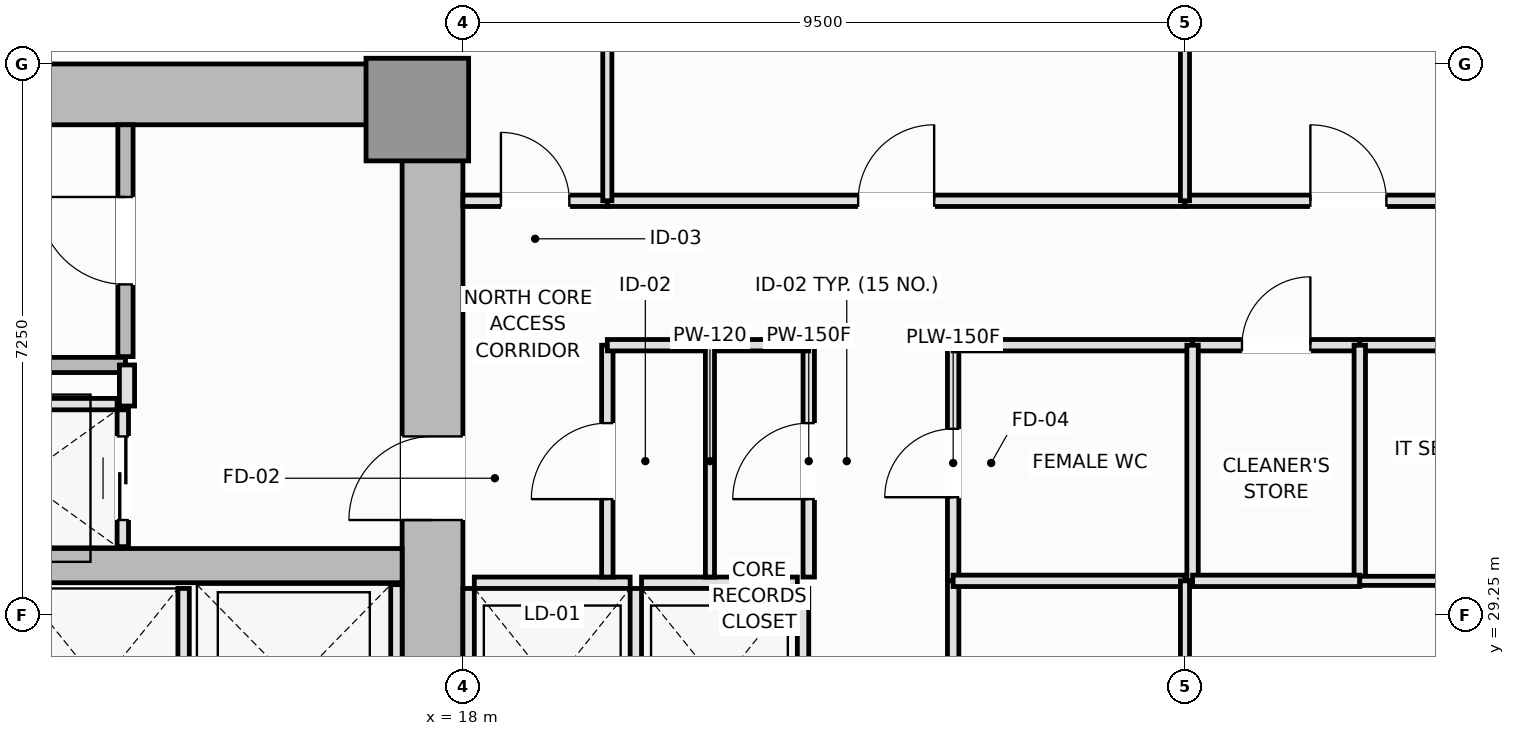
"""IFC4 building model, lengths in metres.
Left out: names, types, materials, properties, quantities, classifications, styles, units other than length and angle.
Written with IfcOpenShell. Run it as: python <this file> out.ifc"""

import sys

from ifc_helpers import new_model, si_unit, direction, frame, frame_2d, origin, origin_2d, place, context, subcontext, project, spatial, rectangle, extrude, element, fill, save


model = new_model("IFC4")
c1 = context("Model", 3, precision=1e-05, world=origin(), true_north=direction((0.0, 1.0)))
c2 = subcontext(c1, "Body", "Model", "MODEL_VIEW")
j1 = project(units=[si_unit("LENGTHUNIT", "METRE"), si_unit("PLANEANGLEUNIT", "RADIAN")], contexts=[c1])
p1 = place(None, origin())
s1 = spatial("IfcSite", under=j1, at=p1, CompositionType="ELEMENT")
p2 = place(p1, origin())
s2 = spatial("IfcBuilding", under=s1, at=p2, CompositionType="ELEMENT")
p3 = place(p2, frame((0.0, 0.0, 75.3)))
s3 = spatial("IfcBuildingStorey", under=s2, at=p3, CompositionType="ELEMENT", Elevation=75.3)
p4 = place(p3, frame((4.5, 36.1, 0.0), z_axis=(0.0, 0.0, 1.0), x_axis=(1.0, 0.0, 0.0)))
e1 = element("IfcWall", 1, at=p4, inside=s3, PredefinedType="SHEAR", context=c2, shape_type="SweptSolid", body=[
    extrude(rectangle(XDim=13.5, YDim=0.8, at=frame_2d((6.75, 0.0))), origin(), (0.0, 0.0, 1.0), 3.55),
])
p5 = place(p3, frame((17.6, 27.05, 0.0), z_axis=(0.0, 0.0, 1.0), x_axis=(0.0, 1.0, 0.0)))
e2 = element("IfcWall", 2, at=p5, inside=s3, PredefinedType="SHEAR", context=c2, shape_type="SweptSolid", body=[
    extrude(rectangle(XDim=8.65, YDim=0.8, at=frame_2d((4.325, 0.0))), origin(), (0.0, 0.0, 1.0), 3.55),
])
p6 = place(p5, frame((3.45, 0.0, 0.0)))
e3 = element("IfcOpeningElement", 3, at=p6, cuts=e2, PredefinedType="OPENING", context=c2, shape_type="SweptSolid", body=[
    extrude(rectangle(XDim=1.1, YDim=2.15, at=frame_2d((0.55, 1.075))), frame((0.0, 0.41, 0.0), z_axis=(0.0, -1.0, 0.0), x_axis=(1.0, 0.0, 0.0)), (0.0, 0.0, 1.0), 0.82),
])
p7 = place(p3, frame((5.3, 29.9, 0.0), z_axis=(0.0, 0.0, 1.0), x_axis=(1.0, 0.0, 0.0)))
e4 = element("IfcWall", 4, at=p7, inside=s3, PredefinedType="SHEAR", context=c2, shape_type="SweptSolid", body=[
    extrude(rectangle(XDim=11.9, YDim=0.45, at=frame_2d((5.95, 0.0))), origin(), (0.0, 0.0, 1.0), 3.55),
])
p8 = place(p3, frame((17.4, 35.9, 0.0), z_axis=(0.0, 0.0, 1.0), x_axis=(1.0, 0.0, 0.0)))
e5 = element("IfcColumn", 5, at=p8, inside=s3, PredefinedType="PILASTER", context=c2, shape_type="SweptSolid", body=[
    extrude(rectangle(XDim=1.35, YDim=1.35, at=origin_2d()), origin(), (0.0, 0.0, 1.0), 3.55),
])
p9 = place(p3, frame((5.9, 32.54, 0.0), z_axis=(0.0, 0.0, 1.0), x_axis=(1.0, 0.0, 0.0)))
e6 = element("IfcWall", 6, at=p9, inside=s3, PredefinedType="SOLIDWALL", context=c2, shape_type="SweptSolid", body=[
    extrude(rectangle(XDim=7.66, YDim=0.2, at=frame_2d((3.83, 0.0))), origin(), (0.0, 0.0, 1.0), 3.55),
])
p10 = place(p3, frame((13.56, 32.65, 0.0), z_axis=(0.0, 0.0, 1.0), x_axis=(0.0, 1.0, 0.0)))
e7 = element("IfcWall", 7, at=p10, inside=s3, PredefinedType="SOLIDWALL", context=c2, shape_type="SweptSolid", body=[
    extrude(rectangle(XDim=3.05, YDim=0.2, at=frame_2d((1.525, 0.0))), origin(), (0.0, 0.0, 1.0), 3.55),
])
p11 = place(p10, frame((0.95, 0.0, 0.0)))
e8 = element("IfcOpeningElement", 8, at=p11, cuts=e7, PredefinedType="OPENING", context=c2, shape_type="SweptSolid", body=[
    extrude(rectangle(XDim=1.15, YDim=2.15, at=frame_2d((0.575, 1.075))), frame((0.0, 0.11, 0.0), z_axis=(0.0, -1.0, 0.0), x_axis=(1.0, 0.0, 0.0)), (0.0, 0.0, 1.0), 0.22),
])
p12 = place(p3, frame((18.15, 29.675, 0.0), z_axis=(0.0, 0.0, 1.0), x_axis=(1.0, 0.0, 0.0)))
e9 = element("IfcWall", 9, at=p12, inside=s3, PredefinedType="PARTITIONING", context=c2, shape_type="SweptSolid", body=[
    extrude(rectangle(XDim=2.05, YDim=0.15, at=frame_2d((1.025, 0.0))), origin(), (0.0, 0.0, 1.0), 3.37),
])
for number, where, z_axis, x_axis in (
    (10, (18.075, 27.05, 0.0), (0.0, 0.0, 1.0), (0.0, 1.0, 0.0)),
    (11, (20.275, 27.05, 0.0), (0.0, 0.0, 1.0), (0.0, 1.0, 0.0)),
):
    element("IfcWall", number, at=place(p3, frame(where, z_axis=z_axis, x_axis=x_axis)), inside=s3, PredefinedType="PARTITIONING", context=c2, shape_type="SweptSolid", body=[
        extrude(rectangle(XDim=2.55, YDim=0.15, at=frame_2d((1.275, 0.0))), origin(), (0.0, 0.0, 1.0), 3.37),
    ])
p13 = place(p3, frame((20.35, 29.675, 0.0), z_axis=(0.0, 0.0, 1.0), x_axis=(1.0, 0.0, 0.0)))
e12 = element("IfcWall", 12, at=p13, inside=s3, PredefinedType="PARTITIONING", context=c2, shape_type="SweptSolid", body=[
    extrude(rectangle(XDim=2.05, YDim=0.15, at=frame_2d((1.025, 0.0))), origin(), (0.0, 0.0, 1.0), 3.37),
])
for number, where, z_axis, x_axis in (
    (13, (22.475, 27.05, 0.0), (0.0, 0.0, 1.0), (0.0, 1.0, 0.0)),
    (14, (14.325, 27.05, 0.0), (0.0, 0.0, 1.0), (0.0, 1.0, 0.0)),
):
    element("IfcWall", number, at=place(p3, frame(where, z_axis=z_axis, x_axis=x_axis)), inside=s3, PredefinedType="PARTITIONING", context=c2, shape_type="SweptSolid", body=[
        extrude(rectangle(XDim=2.55, YDim=0.15, at=frame_2d((1.275, 0.0))), origin(), (0.0, 0.0, 1.0), 3.37),
    ])
p14 = place(p3, frame((17.125, 27.05, 0.0), z_axis=(0.0, 0.0, 1.0), x_axis=(0.0, 1.0, 0.0)))
e15 = element("IfcWall", 15, at=p14, inside=s3, PredefinedType="PARTITIONING", context=c2, shape_type="SweptSolid", body=[
    extrude(rectangle(XDim=2.6, YDim=0.15, at=frame_2d((1.3, 0.0))), origin(), (0.0, 0.0, 1.0), 3.37),
])
p15 = place(p3, frame((10.95, 32.025, 0.0), z_axis=(0.0, 0.0, 1.0), x_axis=(1.0, 0.0, 0.0)))
e16 = element("IfcWall", 16, at=p15, inside=s3, PredefinedType="PARTITIONING", context=c2, shape_type="SweptSolid", body=[
    extrude(rectangle(XDim=2.5, YDim=0.15, at=frame_2d((1.25, 0.0))), origin(), (0.0, 0.0, 1.0), 3.37),
])
p16 = place(p3, frame((13.525, 30.15, 0.0), z_axis=(0.0, 0.0, 1.0), x_axis=(0.0, 1.0, 0.0)))
e17 = element("IfcWall", 17, at=p16, inside=s3, PredefinedType="PARTITIONING", context=c2, shape_type="SweptSolid", body=[
    extrude(rectangle(XDim=1.8, YDim=0.15, at=frame_2d((0.9, 0.0))), origin(), (0.0, 0.0, 1.0), 3.37),
])
p17 = place(p16, frame((0.35, 0.0, 0.0)))
e18 = element("IfcOpeningElement", 18, at=p17, cuts=e17, PredefinedType="OPENING", context=c2, shape_type="SweptSolid", body=[
    extrude(rectangle(XDim=1.1, YDim=2.2, at=frame_2d((0.55, 1.1))), frame((0.0, 0.085, 0.0), z_axis=(0.0, -1.0, 0.0), x_axis=(1.0, 0.0, 0.0)), (0.0, 0.0, 1.0), 0.17),
])
p18 = place(p3, frame((13.58, 32.0, 0.0), z_axis=(0.0, 0.0, 1.0), x_axis=(0.0, 1.0, 0.0)))
e19 = element("IfcWall", 19, at=p18, inside=s3, PredefinedType="PARTITIONING", context=c2, shape_type="SweptSolid", body=[
    extrude(rectangle(XDim=0.54, YDim=0.2, at=frame_2d((0.27, 0.0))), origin(), (0.0, 0.0, 1.0), 3.37),
])
p19 = place(p3, frame((22.55, 29.75, 0.0), z_axis=(0.0, 0.0, 1.0), x_axis=(0.0, 1.0, 0.0)))
e20 = element("IfcWall", 20, at=p19, inside=s3, PredefinedType="PARTITIONING", context=c2, shape_type="SweptSolid", body=[
    extrude(rectangle(XDim=3.05, YDim=0.15, at=frame_2d((1.525, 0.0))), origin(), (0.0, 0.0, 1.0), 3.01),
])
p20 = place(p19, frame((1.025, 0.0, 0.0)))
e21 = element("IfcOpeningElement", 21, at=p20, cuts=e20, PredefinedType="OPENING", context=c2, shape_type="SweptSolid", body=[
    extrude(rectangle(XDim=1.0, YDim=2.15, at=frame_2d((0.5, 1.075))), frame((0.0, 0.085, 0.0), z_axis=(0.0, -1.0, 0.0), x_axis=(1.0, 0.0, 0.0)), (0.0, 0.0, 1.0), 0.17),
])
p21 = place(p3, frame((24.45, 29.7, 0.0), z_axis=(0.0, 0.0, 1.0), x_axis=(0.0, 1.0, 0.0)))
e22 = element("IfcWall", 22, at=p21, inside=s3, PredefinedType="PLUMBINGWALL", context=c2, shape_type="SweptSolid", body=[
    extrude(rectangle(XDim=3.1, YDim=0.15, at=frame_2d((1.55, 0.0))), origin(), (0.0, 0.0, 1.0), 3.37),
])
p22 = place(p21, frame((1.1, 0.0, 0.0)))
e23 = element("IfcOpeningElement", 23, at=p22, cuts=e22, PredefinedType="OPENING", context=c2, shape_type="SweptSolid", body=[
    extrude(rectangle(XDim=0.9, YDim=2.1, at=frame_2d((0.45, 1.05))), frame((0.0, 0.085, 0.0), z_axis=(0.0, -1.0, 0.0), x_axis=(1.0, 0.0, 0.0)), (0.0, 0.0, 1.0), 0.17),
])
p23 = place(p3, frame((24.45, 20.8, 0.0), z_axis=(0.0, 0.0, 1.0), x_axis=(0.0, 1.0, 0.0)))
e24 = element("IfcWall", 24, at=p23, inside=s3, PredefinedType="PARTITIONING", context=c2, shape_type="SweptSolid", body=[
    extrude(rectangle(XDim=8.9, YDim=0.15, at=frame_2d((4.45, 0.0))), origin(), (0.0, 0.0, 1.0), 3.37),
])
p24 = place(p23, frame((3.95, 0.0, 0.0)))
e25 = element("IfcOpeningElement", 25, at=p24, cuts=e24, PredefinedType="OPENING", context=c2, shape_type="SweptSolid", body=[
    extrude(rectangle(XDim=1.0, YDim=2.15, at=frame_2d((0.5, 1.075))), frame((0.0, 0.085, 0.0), z_axis=(0.0, -1.0, 0.0), x_axis=(1.0, 0.0, 0.0)), (0.0, 0.0, 1.0), 0.17),
])
p25 = place(p3, frame((19.9, 29.75, 0.0), z_axis=(0.0, 0.0, 1.0), x_axis=(0.0, 1.0, 0.0)))
e26 = element("IfcWall", 26, at=p25, inside=s3, PredefinedType="PARTITIONING", context=c2, shape_type="SweptSolid", body=[
    extrude(rectangle(XDim=3.05, YDim=0.15, at=frame_2d((1.525, 0.0))), origin(), (0.0, 0.0, 1.0), 3.37),
])
p26 = place(p25, frame((1.025, 0.0, 0.0)))
e27 = element("IfcOpeningElement", 27, at=p26, cuts=e26, PredefinedType="OPENING", context=c2, shape_type="SweptSolid", body=[
    extrude(rectangle(XDim=1.0, YDim=2.15, at=frame_2d((0.5, 1.075))), frame((0.0, 0.085, 0.0), z_axis=(0.0, -1.0, 0.0), x_axis=(1.0, 0.0, 0.0)), (0.0, 0.0, 1.0), 0.17),
])
p27 = place(p3, frame((19.9, 32.8, 0.0), z_axis=(0.0, 0.0, 1.0), x_axis=(1.0, 0.0, 0.0)))
e28 = element("IfcWall", 28, at=p27, inside=s3, PredefinedType="PARTITIONING", context=c2, shape_type="SweptSolid", body=[
    extrude(rectangle(XDim=1.35, YDim=0.15, at=frame_2d((0.675, 0.0))), origin(), (0.0, 0.0, 1.0), 3.37),
])
p28 = place(p3, frame((21.25, 32.8, 0.0), z_axis=(0.0, 0.0, 1.0), x_axis=(1.0, 0.0, 0.0)))
e29 = element("IfcWall", 29, at=p28, inside=s3, PredefinedType="PARTITIONING", context=c2, shape_type="SweptSolid", body=[
    extrude(rectangle(XDim=1.3, YDim=0.15, at=frame_2d((0.65, 0.0))), origin(), (0.0, 0.0, 1.0), 3.37),
])
p29 = place(p3, frame((24.45, 32.8, 0.0), z_axis=(0.0, 0.0, 1.0), x_axis=(1.0, 0.0, 0.0)))
e30 = element("IfcWall", 30, at=p29, inside=s3, PredefinedType="PLUMBINGWALL", context=c2, shape_type="SweptSolid", body=[
    extrude(rectangle(XDim=3.15, YDim=0.15, at=frame_2d((1.575, 0.0))), origin(), (0.0, 0.0, 1.0), 3.37),
])
p30 = place(p3, frame((27.6, 32.8, 0.0), z_axis=(0.0, 0.0, 1.0), x_axis=(1.0, 0.0, 0.0)))
e31 = element("IfcWall", 31, at=p30, inside=s3, PredefinedType="PLUMBINGWALL", context=c2, shape_type="SweptSolid", body=[
    extrude(rectangle(XDim=2.2, YDim=0.15, at=frame_2d((1.1, 0.0))), origin(), (0.0, 0.0, 1.0), 3.37),
])
p31 = place(p30, frame((0.65, 0.0, 0.0)))
e32 = element("IfcOpeningElement", 32, at=p31, cuts=e31, PredefinedType="OPENING", context=c2, shape_type="SweptSolid", body=[
    extrude(rectangle(XDim=0.9, YDim=2.1, at=frame_2d((0.45, 1.05))), frame((0.0, 0.085, 0.0), z_axis=(0.0, -1.0, 0.0), x_axis=(1.0, 0.0, 0.0)), (0.0, 0.0, 1.0), 0.17),
])
p32 = place(p3, frame((29.8, 32.8, 0.0), z_axis=(0.0, 0.0, 1.0), x_axis=(1.0, 0.0, 0.0)))
e33 = element("IfcWall", 33, at=p32, inside=s3, PredefinedType="PARTITIONING", context=c2, shape_type="SweptSolid", body=[
    extrude(rectangle(XDim=5.0, YDim=0.15, at=frame_2d((2.5, 0.0))), origin(), (0.0, 0.0, 1.0), 3.37),
])
p33 = place(p3, frame((18.0, 34.7, 0.0), z_axis=(0.0, 0.0, 1.0), x_axis=(1.0, 0.0, 0.0)))
e34 = element("IfcWall", 34, at=p33, inside=s3, PredefinedType="PARTITIONING", context=c2, shape_type="SweptSolid", body=[
    extrude(rectangle(XDim=1.9, YDim=0.15, at=frame_2d((0.95, 0.0))), origin(), (0.0, 0.0, 1.0), 3.37),
])
p34 = place(p33, frame((0.5, 0.0, 0.0)))
e35 = element("IfcOpeningElement", 35, at=p34, cuts=e34, PredefinedType="OPENING", context=c2, shape_type="SweptSolid", body=[
    extrude(rectangle(XDim=0.9, YDim=2.1, at=frame_2d((0.45, 1.05))), frame((0.0, 0.085, 0.0), z_axis=(0.0, -1.0, 0.0), x_axis=(1.0, 0.0, 0.0)), (0.0, 0.0, 1.0), 0.17),
])
p35 = place(p3, frame((19.9, 34.7, 0.0), z_axis=(0.0, 0.0, 1.0), x_axis=(1.0, 0.0, 0.0)))
e36 = element("IfcWall", 36, at=p35, inside=s3, PredefinedType="PARTITIONING", context=c2, shape_type="SweptSolid", body=[
    extrude(rectangle(XDim=7.6, YDim=0.15, at=frame_2d((3.8, 0.0))), origin(), (0.0, 0.0, 1.0), 3.37),
])
p36 = place(p35, frame((3.3, 0.0, 0.0)))
e37 = element("IfcOpeningElement", 37, at=p36, cuts=e36, PredefinedType="OPENING", context=c2, shape_type="SweptSolid", body=[
    extrude(rectangle(XDim=1.0, YDim=2.15, at=frame_2d((0.5, 1.075))), frame((0.0, 0.085, 0.0), z_axis=(0.0, -1.0, 0.0), x_axis=(1.0, 0.0, 0.0)), (0.0, 0.0, 1.0), 0.17),
])
p37 = place(p3, frame((27.5, 34.7, 0.0), z_axis=(0.0, 0.0, 1.0), x_axis=(1.0, 0.0, 0.0)))
e38 = element("IfcWall", 38, at=p37, inside=s3, PredefinedType="PARTITIONING", context=c2, shape_type="SweptSolid", body=[
    extrude(rectangle(XDim=4.3, YDim=0.15, at=frame_2d((2.15, 0.0))), origin(), (0.0, 0.0, 1.0), 3.37),
])
p38 = place(p37, frame((1.65, 0.0, 0.0)))
e39 = element("IfcOpeningElement", 39, at=p38, cuts=e38, PredefinedType="OPENING", context=c2, shape_type="SweptSolid", body=[
    extrude(rectangle(XDim=1.0, YDim=2.15, at=frame_2d((0.5, 1.075))), frame((0.0, 0.085, 0.0), z_axis=(0.0, -1.0, 0.0), x_axis=(1.0, 0.0, 0.0)), (0.0, 0.0, 1.0), 0.17),
])
p39 = place(p3, frame((21.25, 29.75, 0.0), z_axis=(0.0, 0.0, 1.0), x_axis=(0.0, 1.0, 0.0)))
e40 = element("IfcWall", 40, at=p39, inside=s3, PredefinedType="PARTITIONING", context=c2, shape_type="SweptSolid", body=[
    extrude(rectangle(XDim=3.05, YDim=0.12, at=frame_2d((1.525, 0.0))), origin(), (0.0, 0.0, 1.0), 3.37),
])
p40 = place(p3, frame((27.6, 29.7, 0.0), z_axis=(0.0, 0.0, 1.0), x_axis=(0.0, 1.0, 0.0)))
e41 = element("IfcWall", 41, at=p40, inside=s3, PredefinedType="PLUMBINGWALL", context=c2, shape_type="SweptSolid", body=[
    extrude(rectangle(XDim=3.1, YDim=0.15, at=frame_2d((1.55, 0.0))), origin(), (0.0, 0.0, 1.0), 3.37),
])
p41 = place(p3, frame((24.45, 29.7, 0.0), z_axis=(0.0, 0.0, 1.0), x_axis=(1.0, 0.0, 0.0)))
e42 = element("IfcWall", 42, at=p41, inside=s3, PredefinedType="PLUMBINGWALL", context=c2, shape_type="SweptSolid", body=[
    extrude(rectangle(XDim=3.05, YDim=0.15, at=frame_2d((1.525, 0.0))), origin(), (0.0, 0.0, 1.0), 3.37),
])
p42 = place(p3, frame((29.8, 29.7, 0.0), z_axis=(0.0, 0.0, 1.0), x_axis=(0.0, 1.0, 0.0)))
e43 = element("IfcWall", 43, at=p42, inside=s3, PredefinedType="PLUMBINGWALL", context=c2, shape_type="SweptSolid", body=[
    extrude(rectangle(XDim=3.1, YDim=0.15, at=frame_2d((1.55, 0.0))), origin(), (0.0, 0.0, 1.0), 3.37),
])
p43 = place(p3, frame((27.6, 29.7, 0.0), z_axis=(0.0, 0.0, 1.0), x_axis=(1.0, 0.0, 0.0)))
e44 = element("IfcWall", 44, at=p43, inside=s3, PredefinedType="PLUMBINGWALL", context=c2, shape_type="SweptSolid", body=[
    extrude(rectangle(XDim=2.2, YDim=0.15, at=frame_2d((1.1, 0.0))), origin(), (0.0, 0.0, 1.0), 3.37),
])
p44 = place(p3, frame((29.8, 29.7, 0.0), z_axis=(0.0, 0.0, 1.0), x_axis=(1.0, 0.0, 0.0)))
e45 = element("IfcWall", 45, at=p44, inside=s3, PredefinedType="PARTITIONING", context=c2, shape_type="SweptSolid", body=[
    extrude(rectangle(XDim=5.0, YDim=0.12, at=frame_2d((2.5, 0.0))), origin(), (0.0, 0.0, 1.0), 3.37),
])
p45 = place(p3, frame((27.5, 27.0, 0.0), z_axis=(0.0, 0.0, 1.0), x_axis=(0.0, 1.0, 0.0)))
e46 = element("IfcWall", 46, at=p45, inside=s3, PredefinedType="PARTITIONING", context=c2, shape_type="SweptSolid", body=[
    extrude(rectangle(XDim=2.7, YDim=0.12, at=frame_2d((1.35, 0.0))), origin(), (0.0, 0.0, 1.0), 3.37),
])
p46 = place(p3, frame((19.9, 34.7, 0.0), z_axis=(0.0, 0.0, 1.0), x_axis=(0.0, 1.0, 0.0)))
e47 = element("IfcWall", 47, at=p46, inside=s3, PredefinedType="PARTITIONING", context=c2, shape_type="SweptSolid", body=[
    extrude(rectangle(XDim=13.29, YDim=0.12, at=frame_2d((6.645, 0.0))), origin(), (0.0, 0.0, 1.0), 3.37),
])
p47 = place(p3, frame((27.5, 34.7, 0.0), z_axis=(0.0, 0.0, 1.0), x_axis=(0.0, 1.0, 0.0)))
e48 = element("IfcWall", 48, at=p47, inside=s3, PredefinedType="PARTITIONING", context=c2, shape_type="SweptSolid", body=[
    extrude(rectangle(XDim=13.29, YDim=0.12, at=frame_2d((6.645, 0.0))), origin(), (0.0, 0.0, 1.0), 2.82),
])
p48 = place(p11, origin())
e49 = element("IfcDoor", 49, at=p48, inside=s3, OperationType="SINGLE_SWING_RIGHT", PredefinedType="DOOR", context=c2, shape_type="SweptSolid", body=[
    extrude(rectangle(XDim=1.15, YDim=2.15, at=frame_2d((0.575, 1.075))), frame((0.0, 0.025, 0.0), z_axis=(0.0, -1.0, 0.0), x_axis=(1.0, 0.0, 0.0)), (0.0, 0.0, 1.0), 0.05),
])
fill(e8, e49)
p49 = place(p17, origin())
e50 = element("IfcDoor", 50, at=p49, inside=s3, OperationType="DOUBLE_DOOR_SLIDING", PredefinedType="DOOR", context=c2, shape_type="SweptSolid", body=[
    extrude(rectangle(XDim=1.1, YDim=2.2, at=frame_2d((0.55, 1.1))), frame((0.0, 0.025, 0.0), z_axis=(0.0, -1.0, 0.0), x_axis=(1.0, 0.0, 0.0)), (0.0, 0.0, 1.0), 0.05),
])
fill(e18, e50)
p50 = place(p6, origin())
e51 = element("IfcDoor", 51, at=p50, inside=s3, OperationType="SINGLE_SWING_LEFT", PredefinedType="DOOR", context=c2, shape_type="SweptSolid", body=[
    extrude(rectangle(XDim=1.1, YDim=2.15, at=frame_2d((0.55, 1.075))), frame((0.0, 0.025, 0.0), z_axis=(0.0, -1.0, 0.0), x_axis=(1.0, 0.0, 0.0)), (0.0, 0.0, 1.0), 0.05),
])
fill(e3, e51)
p51 = place(p20, origin())
e52 = element("IfcDoor", 52, at=p51, inside=s3, OperationType="SINGLE_SWING_LEFT", PredefinedType="DOOR", context=c2, shape_type="SweptSolid", body=[
    extrude(rectangle(XDim=1.0, YDim=2.15, at=frame_2d((0.5, 1.075))), frame((0.0, 0.025, 0.0), z_axis=(0.0, -1.0, 0.0), x_axis=(1.0, 0.0, 0.0)), (0.0, 0.0, 1.0), 0.05),
])
fill(e21, e52)
p52 = place(p22, origin())
e53 = element("IfcDoor", 53, at=p52, inside=s3, OperationType="SINGLE_SWING_LEFT", PredefinedType="DOOR", context=c2, shape_type="SweptSolid", body=[
    extrude(rectangle(XDim=0.9, YDim=2.1, at=frame_2d((0.45, 1.05))), frame((0.0, 0.025, 0.0), z_axis=(0.0, -1.0, 0.0), x_axis=(1.0, 0.0, 0.0)), (0.0, 0.0, 1.0), 0.05),
])
fill(e23, e53)
p53 = place(p26, origin())
e54 = element("IfcDoor", 54, at=p53, inside=s3, OperationType="SINGLE_SWING_LEFT", PredefinedType="DOOR", context=c2, shape_type="SweptSolid", body=[
    extrude(rectangle(XDim=1.0, YDim=2.15, at=frame_2d((0.5, 1.075))), frame((0.0, 0.025, 0.0), z_axis=(0.0, -1.0, 0.0), x_axis=(1.0, 0.0, 0.0)), (0.0, 0.0, 1.0), 0.05),
])
fill(e27, e54)
p54 = place(p31, origin())
e55 = element("IfcDoor", 55, at=p54, inside=s3, OperationType="SINGLE_SWING_RIGHT", PredefinedType="DOOR", context=c2, shape_type="SweptSolid", body=[
    extrude(rectangle(XDim=0.9, YDim=2.1, at=frame_2d((0.45, 1.05))), frame((0.0, 0.025, 0.0), z_axis=(0.0, -1.0, 0.0), x_axis=(1.0, 0.0, 0.0)), (0.0, 0.0, 1.0), 0.05),
])
fill(e32, e55)
p55 = place(p34, origin())
e56 = element("IfcDoor", 56, at=p55, inside=s3, OperationType="SINGLE_SWING_LEFT", PredefinedType="DOOR", context=c2, shape_type="SweptSolid", body=[
    extrude(rectangle(XDim=0.9, YDim=2.1, at=frame_2d((0.45, 1.05))), frame((0.0, 0.025, 0.0), z_axis=(0.0, -1.0, 0.0), x_axis=(1.0, 0.0, 0.0)), (0.0, 0.0, 1.0), 0.05),
])
fill(e35, e56)
p56 = place(p36, origin())
e57 = element("IfcDoor", 57, at=p56, inside=s3, OperationType="SINGLE_SWING_RIGHT", PredefinedType="DOOR", context=c2, shape_type="SweptSolid", body=[
    extrude(rectangle(XDim=1.0, YDim=2.15, at=frame_2d((0.5, 1.075))), frame((0.0, 0.025, 0.0), z_axis=(0.0, -1.0, 0.0), x_axis=(1.0, 0.0, 0.0)), (0.0, 0.0, 1.0), 0.05),
])
fill(e37, e57)
p57 = place(p38, origin())
e58 = element("IfcDoor", 58, at=p57, inside=s3, OperationType="SINGLE_SWING_LEFT", PredefinedType="DOOR", context=c2, shape_type="SweptSolid", body=[
    extrude(rectangle(XDim=1.0, YDim=2.15, at=frame_2d((0.5, 1.075))), frame((0.0, 0.025, 0.0), z_axis=(0.0, -1.0, 0.0), x_axis=(1.0, 0.0, 0.0)), (0.0, 0.0, 1.0), 0.05),
])
fill(e39, e58)
save(model, sys.argv[1])
